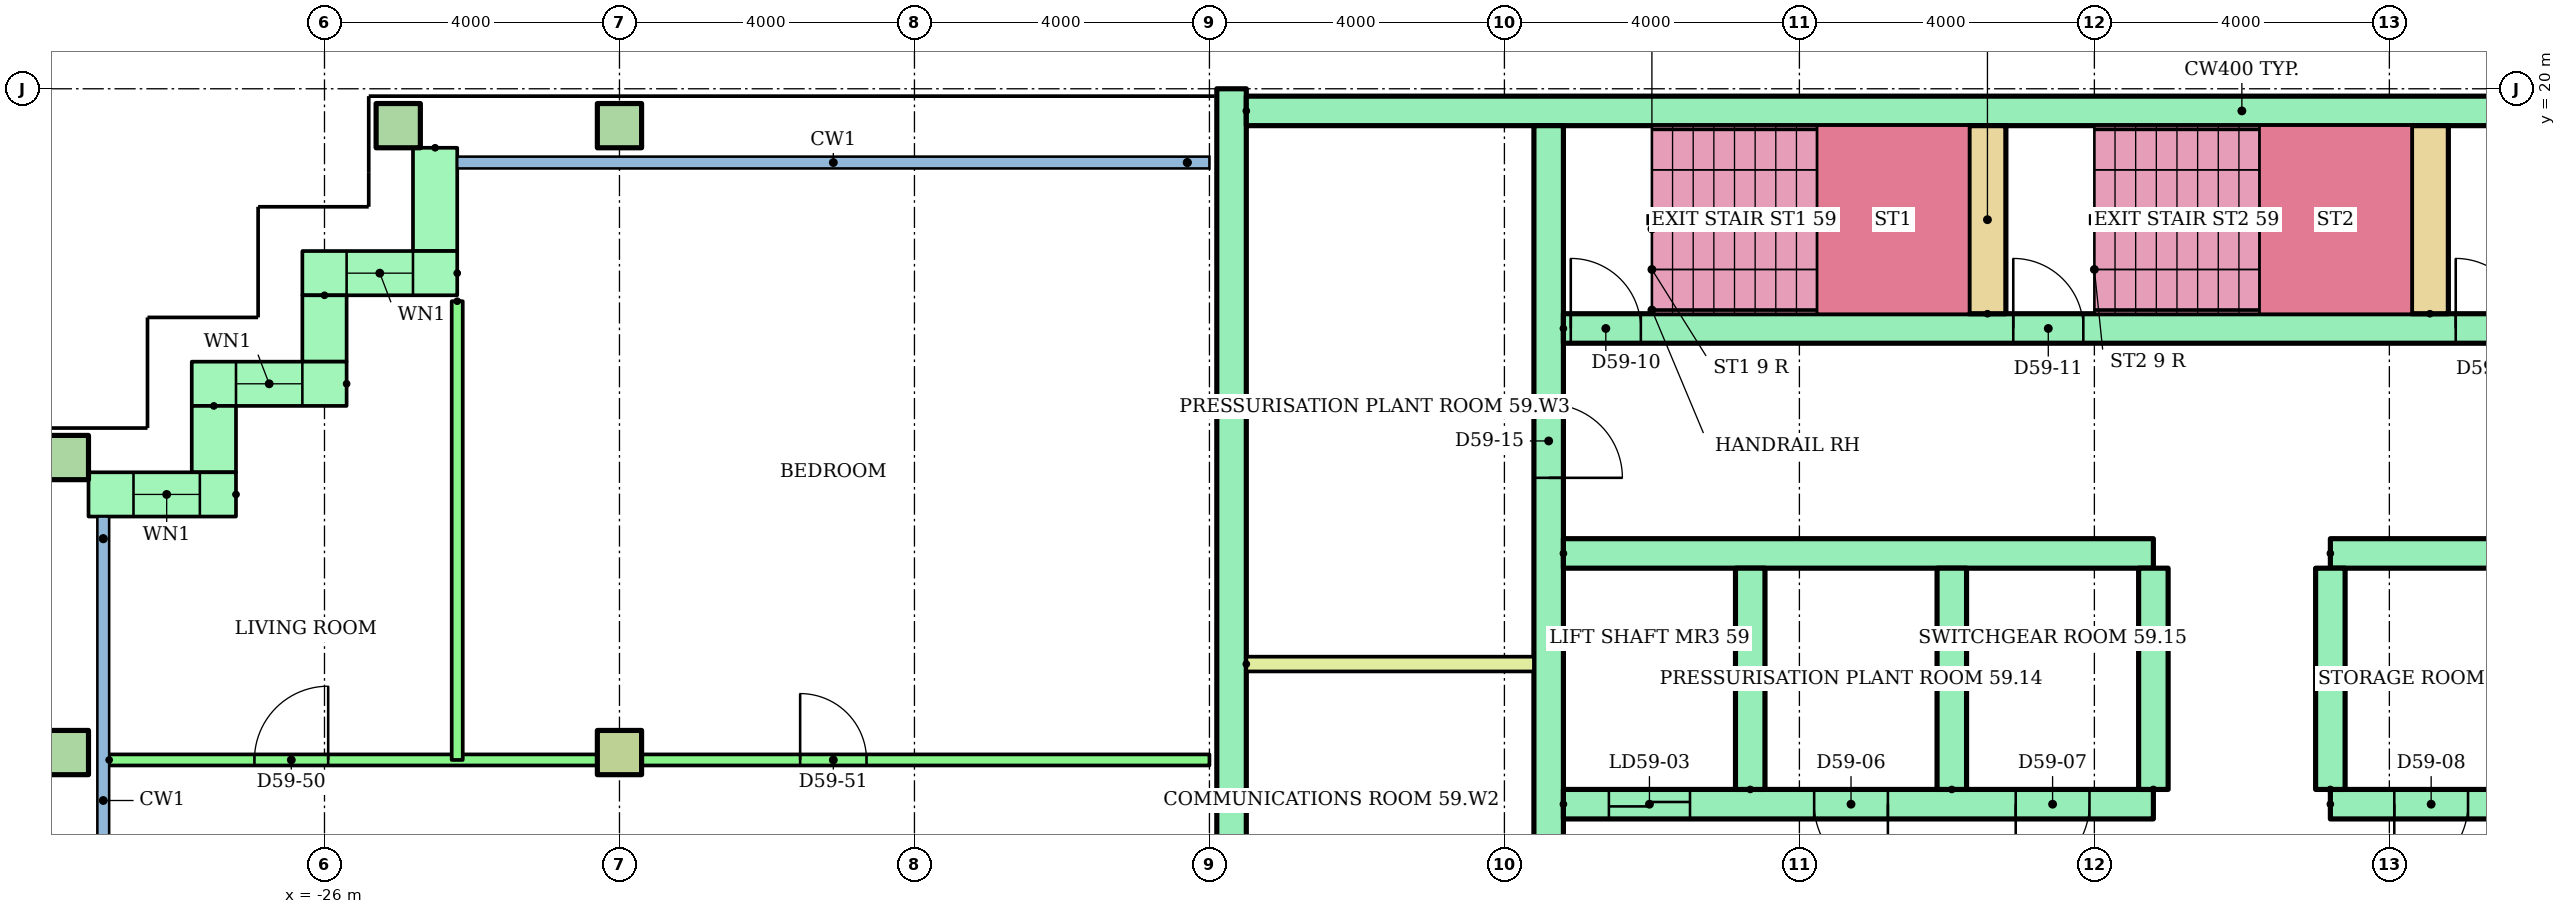
"""IFC4 building model, lengths in metres.
Left out: names, types, materials, properties, quantities, classifications, styles, units other than length and angle.
Written with IfcOpenShell. Run it as: python <this file> out.ifc"""

import sys

from ifc_helpers import new_model, si_unit, direction, frame, frame_2d, origin, origin_2d, place, context, subcontext, project, spatial, rectangle, hollow_rectangle, extrude, element, fill, save


model = new_model("IFC4")
c1 = context("Model", 3, precision=1e-05, world=origin(), true_north=direction((0.0, 1.0)))
c2 = subcontext(c1, "Body", "Model", "MODEL_VIEW")
j1 = project(units=[si_unit("LENGTHUNIT", "METRE"), si_unit("PLANEANGLEUNIT", "RADIAN")], contexts=[c1])
p1 = place(None, origin())
s1 = spatial("IfcSite", under=j1, at=p1, CompositionType="ELEMENT")
p2 = place(p1, origin())
s2 = spatial("IfcBuilding", under=s1, at=p2, CompositionType="ELEMENT")
p3 = place(p2, frame((0.0, 0.0, 226.8)))
s3 = spatial("IfcBuildingStorey", under=s2, at=p3, CompositionType="ELEMENT", Elevation=226.8)
p4 = place(p3, frame((-29.5, 11.0, 0.0)))
e1 = element("IfcColumn", 1, at=p4, inside=s3, PredefinedType="COLUMN", context=c2, shape_type="SweptSolid", body=[
    extrude(hollow_rectangle(XDim=0.6, YDim=0.6, WallThickness=0.03, at=origin_2d()), origin(), (0.0, 0.0, 1.0), 3.2),
])
p5 = place(p3, frame((-22.0, 11.0, 0.0)))
e2 = element("IfcColumn", 2, at=p5, inside=s3, PredefinedType="COLUMN", context=c2, shape_type="SweptSolid", body=[
    extrude(rectangle(XDim=0.6, YDim=0.6, at=origin_2d()), origin(), (0.0, 0.0, 1.0), 3.2),
])
for number, where in (
    (3, (-29.5, 15.0, 0.0)),
    (4, (-25.0, 19.5, 0.0)),
    (5, (-22.0, 19.5, 0.0)),
):
    element("IfcColumn", number, at=place(p3, frame(where)), inside=s3, PredefinedType="COLUMN", context=c2, shape_type="SweptSolid", body=[
        extrude(hollow_rectangle(XDim=0.6, YDim=0.6, WallThickness=0.03, at=origin_2d()), origin(), (0.0, 0.0, 1.0), 3.2),
    ])
p6 = place(p3, frame((-24.5, 19.2, 0.0), z_axis=(0.0, 0.0, 1.0), x_axis=(0.0, -1.0, 0.0)))
e6 = element("IfcWall", 6, at=p6, inside=s3, PredefinedType="STANDARD", context=c2, shape_type="SweptSolid", body=[
    extrude(rectangle(XDim=1.4, YDim=0.6, at=frame_2d((0.7, 0.0))), origin(), (0.0, 0.0, 1.0), 2.92),
])
p7 = place(p3, frame((-24.2, 17.5, 0.0), z_axis=(0.0, 0.0, 1.0), x_axis=(-1.0, 0.0, 0.0)))
e7 = element("IfcWall", 7, at=p7, inside=s3, PredefinedType="STANDARD", context=c2, shape_type="SweptSolid", body=[
    extrude(rectangle(XDim=2.1, YDim=0.6, at=frame_2d((1.05, 0.0))), origin(), (0.0, 0.0, 1.0), 2.92),
])
p8 = place(p7, frame((0.6, 0.0, 0.9)))
e8 = element("IfcOpeningElement", 8, at=p8, cuts=e7, PredefinedType="OPENING", context=c2, shape_type="SweptSolid", body=[
    extrude(rectangle(XDim=0.9, YDim=1.5, at=frame_2d((0.45, 0.75))), frame((0.0, 0.31, 0.0), z_axis=(0.0, -1.0, 0.0), x_axis=(1.0, 0.0, 0.0)), (0.0, 0.0, 1.0), 0.62),
])
p9 = place(p3, frame((-26.0, 17.2, 0.0), z_axis=(0.0, 0.0, 1.0), x_axis=(0.0, -1.0, 0.0)))
e9 = element("IfcWall", 9, at=p9, inside=s3, PredefinedType="STANDARD", context=c2, shape_type="SweptSolid", body=[
    extrude(rectangle(XDim=0.9, YDim=0.6, at=frame_2d((0.45, 0.0))), origin(), (0.0, 0.0, 1.0), 2.92),
])
p10 = place(p3, frame((-25.7, 16.0, 0.0), z_axis=(0.0, 0.0, 1.0), x_axis=(-1.0, 0.0, 0.0)))
e10 = element("IfcWall", 10, at=p10, inside=s3, PredefinedType="STANDARD", context=c2, shape_type="SweptSolid", body=[
    extrude(rectangle(XDim=2.1, YDim=0.6, at=frame_2d((1.05, 0.0))), origin(), (0.0, 0.0, 1.0), 2.92),
])
p11 = place(p10, frame((0.6, 0.0, 0.9)))
e11 = element("IfcOpeningElement", 11, at=p11, cuts=e10, PredefinedType="OPENING", context=c2, shape_type="SweptSolid", body=[
    extrude(rectangle(XDim=0.9, YDim=1.5, at=frame_2d((0.45, 0.75))), frame((0.0, 0.31, 0.0), z_axis=(0.0, -1.0, 0.0), x_axis=(1.0, 0.0, 0.0)), (0.0, 0.0, 1.0), 0.62),
])
p12 = place(p3, frame((-27.5, 15.7, 0.0), z_axis=(0.0, 0.0, 1.0), x_axis=(0.0, -1.0, 0.0)))
e12 = element("IfcWall", 12, at=p12, inside=s3, PredefinedType="STANDARD", context=c2, shape_type="SweptSolid", body=[
    extrude(rectangle(XDim=0.9, YDim=0.6, at=frame_2d((0.45, 0.0))), origin(), (0.0, 0.0, 1.0), 2.92),
])
p13 = place(p3, frame((-27.2, 14.5, 0.0), z_axis=(0.0, 0.0, 1.0), x_axis=(-1.0, 0.0, 0.0)))
e13 = element("IfcWall", 13, at=p13, inside=s3, PredefinedType="STANDARD", context=c2, shape_type="SweptSolid", body=[
    extrude(rectangle(XDim=2.0, YDim=0.6, at=frame_2d((1.0, 0.0))), origin(), (0.0, 0.0, 1.0), 2.92),
])
p14 = place(p13, frame((0.49, 0.0, 0.9)))
e14 = element("IfcOpeningElement", 14, at=p14, cuts=e13, PredefinedType="OPENING", context=c2, shape_type="SweptSolid", body=[
    extrude(rectangle(XDim=0.9, YDim=1.5, at=frame_2d((0.45, 0.75))), frame((0.0, 0.31, 0.0), z_axis=(0.0, -1.0, 0.0), x_axis=(1.0, 0.0, 0.0)), (0.0, 0.0, 1.0), 0.62),
])
p15 = place(p3, frame((-13.7, 3.0, 0.0), z_axis=(0.0, 0.0, 1.0), x_axis=(0.0, 1.0, 0.0)))
e15 = element("IfcWall", 15, at=p15, inside=s3, PredefinedType="SHEAR", context=c2, shape_type="SweptSolid", body=[
    extrude(rectangle(XDim=17.0, YDim=0.4, at=frame_2d((8.5, 0.0))), origin(), (0.0, 0.0, 1.0), 2.92),
])
p16 = place(p3, frame((-13.5, 19.7, 0.0)))
e16 = element("IfcWall", 16, at=p16, inside=s3, PredefinedType="SHEAR", context=c2, shape_type="SweptSolid", body=[
    extrude(rectangle(XDim=27.0, YDim=0.4, at=frame_2d((13.5, 0.0))), origin(), (0.0, 0.0, 1.0), 2.92),
])
p17 = place(p3, frame((-9.4, 6.8, 0.0), z_axis=(0.0, 0.0, 1.0), x_axis=(0.0, 1.0, 0.0)))
e17 = element("IfcWall", 17, at=p17, inside=s3, PredefinedType="SHEAR", context=c2, shape_type="SweptSolid", body=[
    extrude(rectangle(XDim=12.7, YDim=0.4, at=frame_2d((6.35, 0.0))), origin(), (0.0, 0.0, 1.0), 2.92),
])
p18 = place(p17, frame((0.3, 0.0, 0.0)))
e18 = element("IfcOpeningElement", 18, at=p18, cuts=e17, PredefinedType="OPENING", context=c2, shape_type="SweptSolid", body=[
    extrude(rectangle(XDim=1.0, YDim=2.1, at=frame_2d((0.5, 1.05))), frame((0.0, 0.21, 0.0), z_axis=(0.0, -1.0, 0.0), x_axis=(1.0, 0.0, 0.0)), (0.0, 0.0, 1.0), 0.42),
])
p19 = place(p17, frame((2.05, 0.0, 0.0)))
e19 = element("IfcOpeningElement", 19, at=p19, cuts=e17, PredefinedType="OPENING", context=c2, shape_type="SweptSolid", body=[
    extrude(rectangle(XDim=1.0, YDim=2.1, at=frame_2d((0.5, 1.05))), frame((0.0, 0.21, 0.0), z_axis=(0.0, -1.0, 0.0), x_axis=(1.0, 0.0, 0.0)), (0.0, 0.0, 1.0), 0.42),
])
p20 = place(p17, frame((7.925, 0.0, 0.0)))
e20 = element("IfcOpeningElement", 20, at=p20, cuts=e17, PredefinedType="OPENING", context=c2, shape_type="SweptSolid", body=[
    extrude(rectangle(XDim=1.0, YDim=2.1, at=frame_2d((0.5, 1.05))), frame((0.0, 0.21, 0.0), z_axis=(0.0, -1.0, 0.0), x_axis=(1.0, 0.0, 0.0)), (0.0, 0.0, 1.0), 0.42),
])
p21 = place(p3, frame((-9.2, 10.3, 0.0)))
e21 = element("IfcWall", 21, at=p21, inside=s3, PredefinedType="SHEAR", context=c2, shape_type="SweptSolid", body=[
    extrude(rectangle(XDim=8.0, YDim=0.4, at=frame_2d((4.0, 0.0))), origin(), (0.0, 0.0, 1.0), 2.92),
])
p22 = place(p21, frame((0.617, 0.0, 0.0)))
e22 = element("IfcOpeningElement", 22, at=p22, cuts=e21, PredefinedType="OPENING", context=c2, shape_type="SweptSolid", body=[
    extrude(rectangle(XDim=1.1, YDim=2.1, at=frame_2d((0.55, 1.05))), frame((0.0, 0.21, 0.0), z_axis=(0.0, -1.0, 0.0), x_axis=(1.0, 0.0, 0.0)), (0.0, 0.0, 1.0), 0.42),
])
p23 = place(p21, frame((3.4, 0.0, 0.0)))
e23 = element("IfcOpeningElement", 23, at=p23, cuts=e21, PredefinedType="OPENING", context=c2, shape_type="SweptSolid", body=[
    extrude(rectangle(XDim=1.0, YDim=2.1, at=frame_2d((0.5, 1.05))), frame((0.0, 0.21, 0.0), z_axis=(0.0, -1.0, 0.0), x_axis=(1.0, 0.0, 0.0)), (0.0, 0.0, 1.0), 0.42),
])
p24 = place(p21, frame((6.133, 0.0, 0.0)))
e24 = element("IfcOpeningElement", 24, at=p24, cuts=e21, PredefinedType="OPENING", context=c2, shape_type="SweptSolid", body=[
    extrude(rectangle(XDim=1.0, YDim=2.1, at=frame_2d((0.5, 1.05))), frame((0.0, 0.21, 0.0), z_axis=(0.0, -1.0, 0.0), x_axis=(1.0, 0.0, 0.0)), (0.0, 0.0, 1.0), 0.42),
])
p25 = place(p3, frame((-9.2, 13.7, 0.0)))
e25 = element("IfcWall", 25, at=p25, inside=s3, PredefinedType="SHEAR", context=c2, shape_type="SweptSolid", body=[
    extrude(rectangle(XDim=8.0, YDim=0.4, at=frame_2d((4.0, 0.0))), origin(), (0.0, 0.0, 1.0), 2.92),
])
p26 = place(p3, frame((1.2, 10.3, 0.0)))
e26 = element("IfcWall", 26, at=p26, inside=s3, PredefinedType="SHEAR", context=c2, shape_type="SweptSolid", body=[
    extrude(rectangle(XDim=8.0, YDim=0.4, at=frame_2d((4.0, 0.0))), origin(), (0.0, 0.0, 1.0), 2.92),
])
p27 = place(p26, frame((3.55, 0.0, 0.0)))
e27 = element("IfcOpeningElement", 27, at=p27, cuts=e26, PredefinedType="OPENING", context=c2, shape_type="SweptSolid", body=[
    extrude(rectangle(XDim=1.1, YDim=2.1, at=frame_2d((0.55, 1.05))), frame((0.0, 0.21, 0.0), z_axis=(0.0, -1.0, 0.0), x_axis=(1.0, 0.0, 0.0)), (0.0, 0.0, 1.0), 0.42),
])
p28 = place(p26, frame((6.283, 0.0, 0.0)))
e28 = element("IfcOpeningElement", 28, at=p28, cuts=e26, PredefinedType="OPENING", context=c2, shape_type="SweptSolid", body=[
    extrude(rectangle(XDim=1.1, YDim=2.1, at=frame_2d((0.55, 1.05))), frame((0.0, 0.21, 0.0), z_axis=(0.0, -1.0, 0.0), x_axis=(1.0, 0.0, 0.0)), (0.0, 0.0, 1.0), 0.42),
])
p29 = place(p26, frame((0.867, 0.0, 0.0)))
e29 = element("IfcOpeningElement", 29, at=p29, cuts=e26, PredefinedType="OPENING", context=c2, shape_type="SweptSolid", body=[
    extrude(rectangle(XDim=1.0, YDim=2.1, at=frame_2d((0.5, 1.05))), frame((0.0, 0.21, 0.0), z_axis=(0.0, -1.0, 0.0), x_axis=(1.0, 0.0, 0.0)), (0.0, 0.0, 1.0), 0.42),
])
p30 = place(p3, frame((1.2, 13.7, 0.0)))
e30 = element("IfcWall", 30, at=p30, inside=s3, PredefinedType="SHEAR", context=c2, shape_type="SweptSolid", body=[
    extrude(rectangle(XDim=8.0, YDim=0.4, at=frame_2d((4.0, 0.0))), origin(), (0.0, 0.0, 1.0), 2.92),
])
for number, where, z_axis, x_axis in (
    (31, (-6.667, 10.5, 0.0), (0.0, 0.0, 1.0), (0.0, 1.0, 0.0)),
    (32, (-3.933, 10.5, 0.0), (0.0, 0.0, 1.0), (0.0, 1.0, 0.0)),
    (33, (-1.2, 10.5, 0.0), (0.0, 0.0, 1.0), (0.0, 1.0, 0.0)),
    (34, (1.2, 10.5, 0.0), (0.0, 0.0, 1.0), (0.0, 1.0, 0.0)),
):
    element("IfcWall", number, at=place(p3, frame(where, z_axis=z_axis, x_axis=x_axis)), inside=s3, PredefinedType="SHEAR", context=c2, shape_type="SweptSolid", body=[
        extrude(rectangle(XDim=3.0, YDim=0.4, at=frame_2d((1.5, 0.0))), origin(), (0.0, 0.0, 1.0), 2.92),
    ])
p31 = place(p3, frame((-9.2, 16.75, 0.0)))
e35 = element("IfcWall", 35, at=p31, inside=s3, PredefinedType="SHEAR", context=c2, shape_type="SweptSolid", body=[
    extrude(rectangle(XDim=18.4, YDim=0.4, at=frame_2d((9.2, 0.0))), origin(), (0.0, 0.0, 1.0), 2.92),
])
p32 = place(p31, frame((0.1, 0.0, 0.0)))
e36 = element("IfcOpeningElement", 36, at=p32, cuts=e35, PredefinedType="OPENING", context=c2, shape_type="SweptSolid", body=[
    extrude(rectangle(XDim=0.95, YDim=2.1, at=frame_2d((0.475, 1.05))), frame((0.0, 0.21, 0.0), z_axis=(0.0, -1.0, 0.0), x_axis=(1.0, 0.0, 0.0)), (0.0, 0.0, 1.0), 0.42),
])
p33 = place(p31, frame((6.1, 0.0, 0.0)))
e37 = element("IfcOpeningElement", 37, at=p33, cuts=e35, PredefinedType="OPENING", context=c2, shape_type="SweptSolid", body=[
    extrude(rectangle(XDim=0.95, YDim=2.1, at=frame_2d((0.475, 1.05))), frame((0.0, 0.21, 0.0), z_axis=(0.0, -1.0, 0.0), x_axis=(1.0, 0.0, 0.0)), (0.0, 0.0, 1.0), 0.42),
])
p34 = place(p31, frame((12.1, 0.0, 0.0)))
e38 = element("IfcOpeningElement", 38, at=p34, cuts=e35, PredefinedType="OPENING", context=c2, shape_type="SweptSolid", body=[
    extrude(rectangle(XDim=0.95, YDim=2.1, at=frame_2d((0.475, 1.05))), frame((0.0, 0.21, 0.0), z_axis=(0.0, -1.0, 0.0), x_axis=(1.0, 0.0, 0.0)), (0.0, 0.0, 1.0), 0.42),
])
for number, where, z_axis, x_axis in (
    (39, (-3.45, 16.95, 0.0), (0.0, 0.0, 1.0), (0.0, 1.0, 0.0)),
    (40, (2.55, 16.95, 0.0), (0.0, 0.0, 1.0), (0.0, 1.0, 0.0)),
):
    element("IfcWall", number, at=place(p3, frame(where, z_axis=z_axis, x_axis=x_axis)), inside=s3, PredefinedType="SHEAR", context=c2, shape_type="SweptSolid", body=[
        extrude(rectangle(XDim=2.55, YDim=0.5, at=frame_2d((1.275, 0.0))), origin(), (0.0, 0.0, 1.0), 2.92),
    ])
p35 = place(p3, frame((-13.5, 12.2, 0.0)))
e41 = element("IfcWall", 41, at=p35, inside=s3, PredefinedType="PARTITIONING", context=c2, shape_type="SweptSolid", body=[
    extrude(rectangle(XDim=3.9, YDim=0.2, at=frame_2d((1.95, 0.0))), origin(), (0.0, 0.0, 1.0), 2.92),
])
p36 = place(p3, frame((-28.92, 10.9, 0.0)))
e42 = element("IfcWall", 42, at=p36, inside=s3, PredefinedType="PARTITIONING", context=c2, shape_type="SweptSolid", body=[
    extrude(rectangle(XDim=14.92, YDim=0.15, at=frame_2d((7.46, 0.0))), origin(), (0.0, 0.0, 1.0), 2.4),
])
p37 = place(p36, frame((1.97, 0.0, 0.0)))
e43 = element("IfcOpeningElement", 43, at=p37, cuts=e42, PredefinedType="OPENING", context=c2, shape_type="SweptSolid", body=[
    extrude(rectangle(XDim=1.0, YDim=2.1, at=frame_2d((0.5, 1.05))), frame((0.0, 0.085, 0.0), z_axis=(0.0, -1.0, 0.0), x_axis=(1.0, 0.0, 0.0)), (0.0, 0.0, 1.0), 0.17),
])
p38 = place(p36, frame((9.37, 0.0, 0.0)))
e44 = element("IfcOpeningElement", 44, at=p38, cuts=e42, PredefinedType="OPENING", context=c2, shape_type="SweptSolid", body=[
    extrude(rectangle(XDim=0.9, YDim=2.1, at=frame_2d((0.45, 1.05))), frame((0.0, 0.085, 0.0), z_axis=(0.0, -1.0, 0.0), x_axis=(1.0, 0.0, 0.0)), (0.0, 0.0, 1.0), 0.17),
])
p39 = place(p3, frame((-24.2, 17.12, 0.0), z_axis=(0.0, 0.0, 1.0), x_axis=(0.0, -1.0, 0.0)))
e45 = element("IfcWall", 45, at=p39, inside=s3, PredefinedType="PARTITIONING", context=c2, shape_type="SweptSolid", body=[
    extrude(rectangle(XDim=6.22, YDim=0.15, at=frame_2d((3.11, 0.0))), origin(), (0.0, 0.0, 1.0), 2.4),
])
p40 = place(p8, origin())
e46 = element("IfcWindow", 46, at=p40, inside=s3, PartitioningType="SINGLE_PANEL", PredefinedType="WINDOW", context=c2, shape_type="SweptSolid", body=[
    extrude(rectangle(XDim=0.9, YDim=1.5, at=frame_2d((0.45, 0.75))), frame((0.0, 0.03, 0.0), z_axis=(0.0, -1.0, 0.0), x_axis=(1.0, 0.0, 0.0)), (0.0, 0.0, 1.0), 0.06),
])
fill(e8, e46)
p41 = place(p11, origin())
e47 = element("IfcWindow", 47, at=p41, inside=s3, PartitioningType="SINGLE_PANEL", PredefinedType="WINDOW", context=c2, shape_type="SweptSolid", body=[
    extrude(rectangle(XDim=0.9, YDim=1.5, at=frame_2d((0.45, 0.75))), frame((0.0, 0.03, 0.0), z_axis=(0.0, -1.0, 0.0), x_axis=(1.0, 0.0, 0.0)), (0.0, 0.0, 1.0), 0.06),
])
fill(e11, e47)
p42 = place(p14, origin())
e48 = element("IfcWindow", 48, at=p42, inside=s3, PartitioningType="SINGLE_PANEL", PredefinedType="WINDOW", context=c2, shape_type="SweptSolid", body=[
    extrude(rectangle(XDim=0.9, YDim=1.5, at=frame_2d((0.45, 0.75))), frame((0.0, 0.03, 0.0), z_axis=(0.0, -1.0, 0.0), x_axis=(1.0, 0.0, 0.0)), (0.0, 0.0, 1.0), 0.06),
])
fill(e14, e48)
p43 = place(p22, origin())
e49 = element("IfcDoor", 49, at=p43, inside=s3, OperationType="SLIDING_TO_LEFT", PredefinedType="DOOR", context=c2, shape_type="SweptSolid", body=[
    extrude(rectangle(XDim=1.1, YDim=2.1, at=frame_2d((0.55, 1.05))), frame((0.0, 0.025, 0.0), z_axis=(0.0, -1.0, 0.0), x_axis=(1.0, 0.0, 0.0)), (0.0, 0.0, 1.0), 0.05),
])
fill(e22, e49)
p44 = place(p23, frame((1.0, 0.0, 0.0), z_axis=(0.0, 0.0, 1.0), x_axis=(-1.0, 0.0, 0.0)))
e50 = element("IfcDoor", 50, at=p44, inside=s3, OperationType="SINGLE_SWING_RIGHT", PredefinedType="DOOR", context=c2, shape_type="SweptSolid", body=[
    extrude(rectangle(XDim=1.0, YDim=2.1, at=frame_2d((0.5, 1.05))), frame((0.0, 0.025, 0.0), z_axis=(0.0, -1.0, 0.0), x_axis=(1.0, 0.0, 0.0)), (0.0, 0.0, 1.0), 0.05),
])
fill(e23, e50)
p45 = place(p24, frame((1.0, 0.0, 0.0), z_axis=(0.0, 0.0, 1.0), x_axis=(-1.0, 0.0, 0.0)))
e51 = element("IfcDoor", 51, at=p45, inside=s3, OperationType="SINGLE_SWING_LEFT", PredefinedType="DOOR", context=c2, shape_type="SweptSolid", body=[
    extrude(rectangle(XDim=1.0, YDim=2.1, at=frame_2d((0.5, 1.05))), frame((0.0, 0.025, 0.0), z_axis=(0.0, -1.0, 0.0), x_axis=(1.0, 0.0, 0.0)), (0.0, 0.0, 1.0), 0.05),
])
fill(e24, e51)
p46 = place(p29, frame((1.0, 0.0, 0.0), z_axis=(0.0, 0.0, 1.0), x_axis=(-1.0, 0.0, 0.0)))
e52 = element("IfcDoor", 52, at=p46, inside=s3, OperationType="SINGLE_SWING_LEFT", PredefinedType="DOOR", context=c2, shape_type="SweptSolid", body=[
    extrude(rectangle(XDim=1.0, YDim=2.1, at=frame_2d((0.5, 1.05))), frame((0.0, 0.025, 0.0), z_axis=(0.0, -1.0, 0.0), x_axis=(1.0, 0.0, 0.0)), (0.0, 0.0, 1.0), 0.05),
])
fill(e29, e52)
p47 = place(p32, origin())
e53 = element("IfcDoor", 53, at=p47, inside=s3, OperationType="SINGLE_SWING_LEFT", PredefinedType="DOOR", context=c2, shape_type="SweptSolid", body=[
    extrude(rectangle(XDim=0.95, YDim=2.1, at=frame_2d((0.475, 1.05))), frame((0.0, 0.025, 0.0), z_axis=(0.0, -1.0, 0.0), x_axis=(1.0, 0.0, 0.0)), (0.0, 0.0, 1.0), 0.05),
])
fill(e36, e53)
p48 = place(p33, origin())
e54 = element("IfcDoor", 54, at=p48, inside=s3, OperationType="SINGLE_SWING_LEFT", PredefinedType="DOOR", context=c2, shape_type="SweptSolid", body=[
    extrude(rectangle(XDim=0.95, YDim=2.1, at=frame_2d((0.475, 1.05))), frame((0.0, 0.025, 0.0), z_axis=(0.0, -1.0, 0.0), x_axis=(1.0, 0.0, 0.0)), (0.0, 0.0, 1.0), 0.05),
])
fill(e37, e54)
p49 = place(p34, origin())
e55 = element("IfcDoor", 55, at=p49, inside=s3, OperationType="SINGLE_SWING_LEFT", PredefinedType="DOOR", context=c2, shape_type="SweptSolid", body=[
    extrude(rectangle(XDim=0.95, YDim=2.1, at=frame_2d((0.475, 1.05))), frame((0.0, 0.025, 0.0), z_axis=(0.0, -1.0, 0.0), x_axis=(1.0, 0.0, 0.0)), (0.0, 0.0, 1.0), 0.05),
])
fill(e38, e55)
p50 = place(p20, frame((1.0, 0.0, 0.0), z_axis=(0.0, 0.0, 1.0), x_axis=(-1.0, 0.0, 0.0)))
e56 = element("IfcDoor", 56, at=p50, inside=s3, OperationType="SINGLE_SWING_LEFT", PredefinedType="DOOR", context=c2, shape_type="SweptSolid", body=[
    extrude(rectangle(XDim=1.0, YDim=2.1, at=frame_2d((0.5, 1.05))), frame((0.0, 0.025, 0.0), z_axis=(0.0, -1.0, 0.0), x_axis=(1.0, 0.0, 0.0)), (0.0, 0.0, 1.0), 0.05),
])
fill(e20, e56)
p51 = place(p37, origin())
e57 = element("IfcDoor", 57, at=p51, inside=s3, OperationType="SINGLE_SWING_RIGHT", PredefinedType="DOOR", context=c2, shape_type="SweptSolid", body=[
    extrude(rectangle(XDim=1.0, YDim=2.1, at=frame_2d((0.5, 1.05))), frame((0.0, 0.025, 0.0), z_axis=(0.0, -1.0, 0.0), x_axis=(1.0, 0.0, 0.0)), (0.0, 0.0, 1.0), 0.05),
])
fill(e43, e57)
p52 = place(p38, origin())
e58 = element("IfcDoor", 58, at=p52, inside=s3, OperationType="SINGLE_SWING_LEFT", PredefinedType="DOOR", context=c2, shape_type="SweptSolid", body=[
    extrude(rectangle(XDim=0.9, YDim=2.1, at=frame_2d((0.45, 1.05))), frame((0.0, 0.025, 0.0), z_axis=(0.0, -1.0, 0.0), x_axis=(1.0, 0.0, 0.0)), (0.0, 0.0, 1.0), 0.05),
])
fill(e44, e58)
save(model, sys.argv[1])
